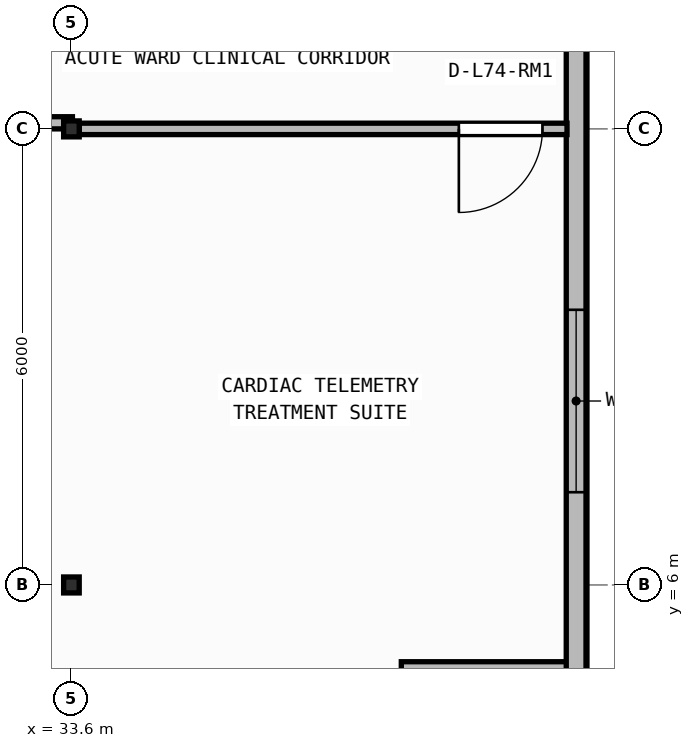
"""IFC4 building model, lengths in metres.
Left out: names, types, materials, properties, quantities, classifications, styles, units other than length and angle.
Written with IfcOpenShell. Run it as: python <this file> out.ifc"""

import sys

from ifc_helpers import new_model, si_unit, direction, frame, frame_2d, origin, origin_2d, place, context, subcontext, project, spatial, rectangle, i_section, extrude, element, fill, save


model = new_model("IFC4")
c1 = context("Model", 3, precision=1e-05, world=origin(), true_north=direction((0.0, 1.0)))
c2 = subcontext(c1, "Body", "Model", "MODEL_VIEW")
j1 = project(units=[si_unit("LENGTHUNIT", "METRE"), si_unit("PLANEANGLEUNIT", "RADIAN")], contexts=[c1])
p1 = place(None, origin())
s1 = spatial("IfcSite", under=j1, at=p1, CompositionType="ELEMENT")
p2 = place(p1, origin())
s2 = spatial("IfcBuilding", under=s1, at=p2, CompositionType="ELEMENT")
p3 = place(p2, frame((0.0, 0.0, 300.0)))
s3 = spatial("IfcBuildingStorey", under=s2, at=p3, CompositionType="ELEMENT", Elevation=300.0)
for number, where, z_axis, x_axis in (
    (1, (33.6, 6.0, 0.0), (0.0, 0.0, 1.0), (1.0, 0.0, 0.0)),
    (2, (33.6, 12.0, 0.0), (0.0, 0.0, 1.0), (1.0, 0.0, 0.0)),
):
    element("IfcColumn", number, at=place(p3, frame(where, z_axis=z_axis, x_axis=x_axis)), inside=s3, PredefinedType="COLUMN", context=c2, shape_type="SweptSolid", body=[
        extrude(i_section(OverallWidth=0.205, OverallDepth=0.21, WebThickness=0.009, FlangeThickness=0.014, FilletRadius=0.011, at=origin_2d()), origin(), (0.0, 0.0, 1.0), 3.95),
    ])
p4 = place(p3, frame((37.94, 4.86, 0.0), z_axis=(0.0, 0.0, 1.0), x_axis=(1.0, 0.0, 0.0)))
e3 = element("IfcWall", 3, at=p4, inside=s3, PredefinedType="STANDARD", context=c2, shape_type="SweptSolid", body=[
    extrude(rectangle(XDim=2.3, YDim=0.26, at=frame_2d((1.15, 0.0))), origin(), (0.0, 0.0, 1.0), 3.67),
])
p5 = place(p3, frame((40.24, 4.86, 0.0), z_axis=(0.0, 0.0, 1.0), x_axis=(0.0, 1.0, 0.0)))
e4 = element("IfcWall", 4, at=p5, inside=s3, PredefinedType="STANDARD", context=c2, shape_type="SweptSolid", body=[
    extrude(rectangle(XDim=20.48, YDim=0.26, at=frame_2d((10.24, 0.0))), origin(), (0.0, 0.0, 1.0), 3.67),
])
p6 = place(p5, frame((2.36, 0.0, 0.9)))
e5 = element("IfcOpeningElement", 5, at=p6, cuts=e4, PredefinedType="OPENING", context=c2, shape_type="SweptSolid", body=[
    extrude(rectangle(XDim=2.4, YDim=1.65, at=frame_2d((1.2, 0.825))), frame((0.0, 0.14, 0.0), z_axis=(0.0, -1.0, 0.0), x_axis=(1.0, 0.0, 0.0)), (0.0, 0.0, 1.0), 0.28),
])
p7 = place(p5, frame((11.15, 0.0, 0.9)))
e6 = element("IfcOpeningElement", 6, at=p7, cuts=e4, PredefinedType="OPENING", context=c2, shape_type="SweptSolid", body=[
    extrude(rectangle(XDim=2.4, YDim=1.65, at=frame_2d((1.2, 0.825))), frame((0.0, 0.14, 0.0), z_axis=(0.0, -1.0, 0.0), x_axis=(1.0, 0.0, 0.0)), (0.0, 0.0, 1.0), 0.28),
])
p8 = place(p3, frame((40.12, 12.0, 0.0), z_axis=(0.0, 0.0, 1.0), x_axis=(-1.0, 0.0, 0.0)))
e7 = element("IfcWall", 7, at=p8, inside=s3, PredefinedType="PARTITIONING", context=c2, shape_type="SweptSolid", body=[
    extrude(rectangle(XDim=6.418, YDim=0.15, at=frame_2d((3.209, 0.0))), origin(), (0.0, 0.0, 1.0), 3.67),
])
p9 = place(p8, frame((0.323, 0.0, 0.0)))
e8 = element("IfcOpeningElement", 8, at=p9, cuts=e7, PredefinedType="OPENING", context=c2, shape_type="SweptSolid", body=[
    extrude(rectangle(XDim=1.1, YDim=2.1, at=frame_2d((0.55, 1.05))), frame((0.0, 0.085, 0.0), z_axis=(0.0, -1.0, 0.0), x_axis=(1.0, 0.0, 0.0)), (0.0, 0.0, 1.0), 0.17),
])
p10 = place(p3, frame((31.439, 12.08, 0.0), z_axis=(0.0, 0.0, 1.0), x_axis=(1.0, 0.0, 0.0)))
e9 = element("IfcWall", 9, at=p10, inside=s3, PredefinedType="PARTITIONING", context=c2, shape_type="SweptSolid", body=[
    extrude(rectangle(XDim=2.174, YDim=0.16, at=frame_2d((1.087, 0.0))), origin(), (0.0, 0.0, 1.0), 3.117),
])
p11 = place(p6, origin())
e10 = element("IfcWindow", 10, at=p11, inside=s3, PartitioningType="SINGLE_PANEL", PredefinedType="WINDOW", context=c2, shape_type="SweptSolid", body=[
    extrude(rectangle(XDim=2.4, YDim=1.65, at=frame_2d((1.2, 0.825))), frame((0.0, 0.03, 0.0), z_axis=(0.0, -1.0, 0.0), x_axis=(1.0, 0.0, 0.0)), (0.0, 0.0, 1.0), 0.06),
])
fill(e5, e10)
p12 = place(p9, origin())
e11 = element("IfcDoor", 11, at=p12, inside=s3, OperationType="SINGLE_SWING_RIGHT", PredefinedType="DOOR", context=c2, shape_type="SweptSolid", body=[
    extrude(rectangle(XDim=1.1, YDim=2.1, at=frame_2d((0.55, 1.05))), frame((0.0, 0.025, 0.0), z_axis=(0.0, -1.0, 0.0), x_axis=(1.0, 0.0, 0.0)), (0.0, 0.0, 1.0), 0.05),
])
fill(e8, e11)
save(model, sys.argv[1])
